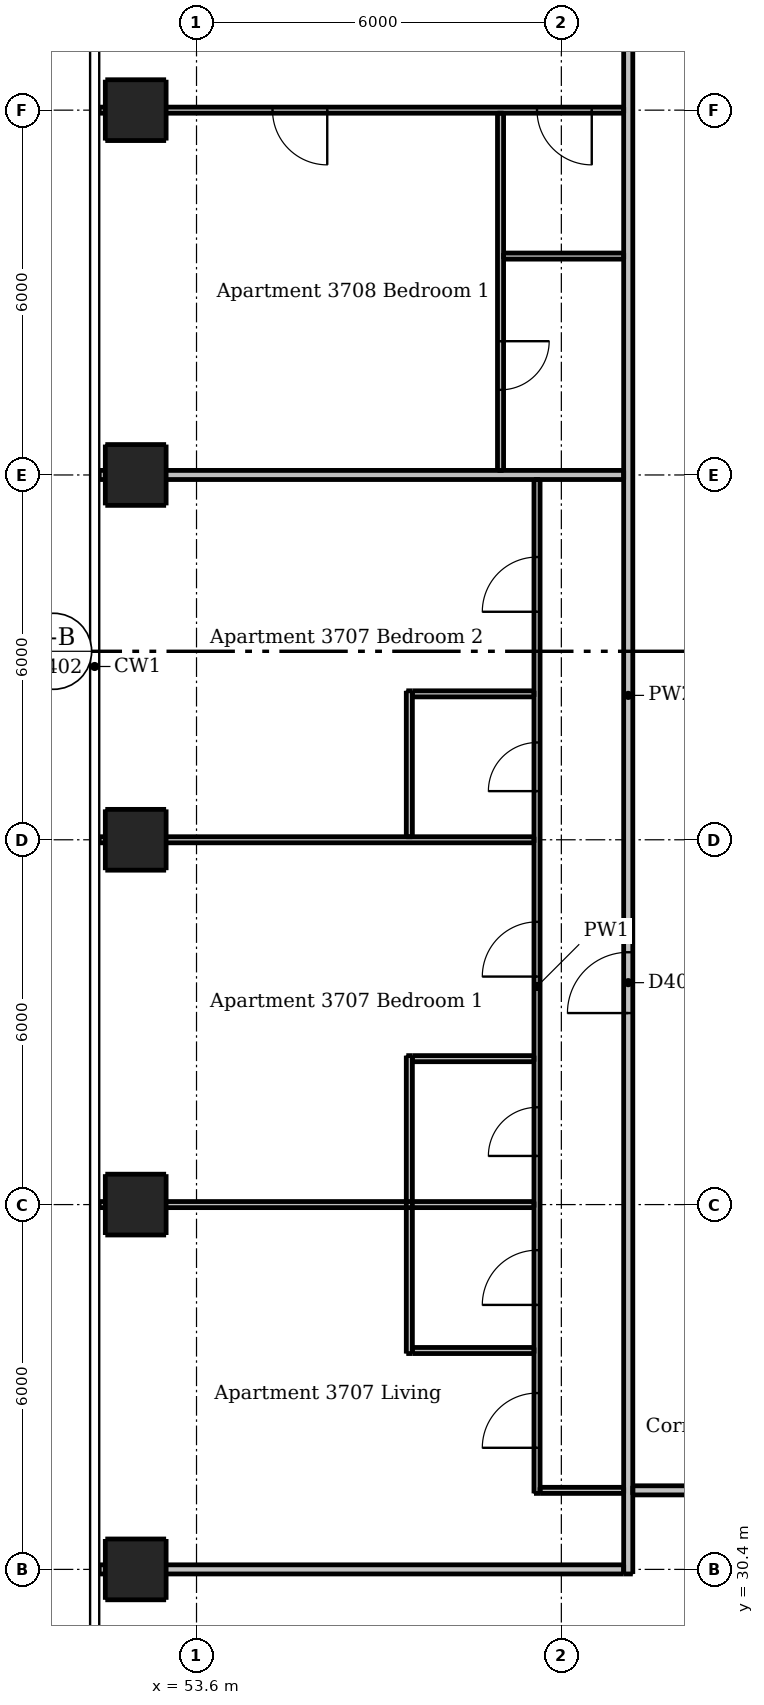
"""IFC4 building model, lengths in metres.
Left out: names, types, materials, properties, quantities, classifications, styles, units other than length and angle.
Written with IfcOpenShell. Run it as: python <this file> out.ifc"""

import sys

from ifc_helpers import new_model, si_unit, direction, frame, frame_2d, origin, origin_2d, place, context, subcontext, project, spatial, rectangle, extrude, element, fill, save


model = new_model("IFC4")
c1 = context("Model", 3, precision=1e-05, world=origin(), true_north=direction((0.0, 1.0)))
c2 = subcontext(c1, "Body", "Model", "MODEL_VIEW")
j1 = project(units=[si_unit("LENGTHUNIT", "METRE"), si_unit("PLANEANGLEUNIT", "RADIAN")], contexts=[c1])
p1 = place(None, origin())
s1 = spatial("IfcSite", under=j1, at=p1, CompositionType="ELEMENT")
p2 = place(p1, origin())
s2 = spatial("IfcBuilding", under=s1, at=p2, CompositionType="ELEMENT")
p3 = place(p2, frame((0.0, 0.0, 140.5)))
s3 = spatial("IfcBuildingStorey", under=s2, at=p3, CompositionType="ELEMENT", Elevation=140.5)
for number, where, z_axis, x_axis in (
    (1, (52.6, 30.4, 0.0), (0.0, 0.0, 1.0), (1.0, 0.0, 0.0)),
    (2, (52.6, 36.4, 0.0), (0.0, 0.0, 1.0), (1.0, 0.0, 0.0)),
    (3, (52.6, 42.4, 0.0), (0.0, 0.0, 1.0), (1.0, 0.0, 0.0)),
    (4, (52.6, 48.4, 0.0), (0.0, 0.0, 1.0), (1.0, 0.0, 0.0)),
    (5, (52.6, 54.4, 0.0), (0.0, 0.0, 1.0), (1.0, 0.0, 0.0)),
):
    element("IfcColumn", number, at=place(p3, frame(where, z_axis=z_axis, x_axis=x_axis)), inside=s3, PredefinedType="COLUMN", context=c2, shape_type="SweptSolid", body=[
        extrude(rectangle(XDim=1.0, YDim=1.0, at=origin_2d()), origin(), (0.0, 0.0, 1.0), 3.05),
    ])
p4 = place(p3, frame((57.1, 33.95, 0.0), z_axis=(0.0, 0.0, 1.0), x_axis=(0.0, 1.0, 0.0)))
e6 = element("IfcWall", 6, at=p4, inside=s3, PredefinedType="PARTITIONING", context=c2, shape_type="SweptSolid", body=[
    extrude(rectangle(XDim=4.9, YDim=0.1, at=frame_2d((2.45, 0.0))), origin(), (0.0, 0.0, 1.0), 3.05),
])
p5 = place(p3, frame((57.1, 42.45, 0.0), z_axis=(0.0, 0.0, 1.0), x_axis=(0.0, 1.0, 0.0)))
e7 = element("IfcWall", 7, at=p5, inside=s3, PredefinedType="PARTITIONING", context=c2, shape_type="SweptSolid", body=[
    extrude(rectangle(XDim=2.4, YDim=0.1, at=frame_2d((1.2, 0.0))), origin(), (0.0, 0.0, 1.0), 3.05),
])
p6 = place(p3, frame((58.6, 54.35, 0.0), z_axis=(0.0, 0.0, 1.0), x_axis=(0.0, -1.0, 0.0)))
e8 = element("IfcWall", 8, at=p6, inside=s3, PredefinedType="PARTITIONING", context=c2, shape_type="SweptSolid", body=[
    extrude(rectangle(XDim=5.875, YDim=0.1, at=frame_2d((2.938, 0.0))), origin(), (0.0, 0.0, 1.0), 3.05),
])
p7 = place(p6, frame((3.75, 0.0, 0.0)))
e9 = element("IfcOpeningElement", 9, at=p7, cuts=e8, PredefinedType="OPENING", context=c2, shape_type="SweptSolid", body=[
    extrude(rectangle(XDim=0.8, YDim=2.1, at=frame_2d((0.4, 1.05))), frame((0.0, 0.06, 0.0), z_axis=(0.0, -1.0, 0.0), x_axis=(1.0, 0.0, 0.0)), (0.0, 0.0, 1.0), 0.12),
])
p8 = place(p3, frame((59.2, 31.65, 0.0), z_axis=(0.0, 0.0, 1.0), x_axis=(0.0, 1.0, 0.0)))
e10 = element("IfcWall", 10, at=p8, inside=s3, PredefinedType="PARTITIONING", context=c2, shape_type="SweptSolid", body=[
    extrude(rectangle(XDim=16.675, YDim=0.1, at=frame_2d((8.337, 0.0))), origin(), (0.0, 0.0, 1.0), 3.05),
])
p9 = place(p8, frame((0.75, 0.0, 0.0)))
e11 = element("IfcOpeningElement", 11, at=p9, cuts=e10, PredefinedType="OPENING", context=c2, shape_type="SweptSolid", body=[
    extrude(rectangle(XDim=0.9, YDim=2.1, at=frame_2d((0.45, 1.05))), frame((0.0, 0.06, 0.0), z_axis=(0.0, -1.0, 0.0), x_axis=(1.0, 0.0, 0.0)), (0.0, 0.0, 1.0), 0.12),
])
p10 = place(p8, frame((3.1, 0.0, 0.0)))
e12 = element("IfcOpeningElement", 12, at=p10, cuts=e10, PredefinedType="OPENING", context=c2, shape_type="SweptSolid", body=[
    extrude(rectangle(XDim=0.9, YDim=2.1, at=frame_2d((0.45, 1.05))), frame((0.0, 0.06, 0.0), z_axis=(0.0, -1.0, 0.0), x_axis=(1.0, 0.0, 0.0)), (0.0, 0.0, 1.0), 0.12),
])
p11 = place(p8, frame((8.5, 0.0, 0.0)))
e13 = element("IfcOpeningElement", 13, at=p11, cuts=e10, PredefinedType="OPENING", context=c2, shape_type="SweptSolid", body=[
    extrude(rectangle(XDim=0.9, YDim=2.1, at=frame_2d((0.45, 1.05))), frame((0.0, 0.06, 0.0), z_axis=(0.0, -1.0, 0.0), x_axis=(1.0, 0.0, 0.0)), (0.0, 0.0, 1.0), 0.12),
])
p12 = place(p8, frame((14.5, 0.0, 0.0)))
e14 = element("IfcOpeningElement", 14, at=p12, cuts=e10, PredefinedType="OPENING", context=c2, shape_type="SweptSolid", body=[
    extrude(rectangle(XDim=0.9, YDim=2.1, at=frame_2d((0.45, 1.05))), frame((0.0, 0.06, 0.0), z_axis=(0.0, -1.0, 0.0), x_axis=(1.0, 0.0, 0.0)), (0.0, 0.0, 1.0), 0.12),
])
p13 = place(p8, frame((5.55, 0.0, 0.0)))
e15 = element("IfcOpeningElement", 15, at=p13, cuts=e10, PredefinedType="OPENING", context=c2, shape_type="SweptSolid", body=[
    extrude(rectangle(XDim=0.8, YDim=2.1, at=frame_2d((0.4, 1.05))), frame((0.0, 0.06, 0.0), z_axis=(0.0, -1.0, 0.0), x_axis=(1.0, 0.0, 0.0)), (0.0, 0.0, 1.0), 0.12),
])
p14 = place(p8, frame((11.55, 0.0, 0.0)))
e16 = element("IfcOpeningElement", 16, at=p14, cuts=e10, PredefinedType="OPENING", context=c2, shape_type="SweptSolid", body=[
    extrude(rectangle(XDim=0.8, YDim=2.1, at=frame_2d((0.4, 1.05))), frame((0.0, 0.06, 0.0), z_axis=(0.0, -1.0, 0.0), x_axis=(1.0, 0.0, 0.0)), (0.0, 0.0, 1.0), 0.12),
])
p15 = place(p3, frame((60.625, 54.4, 0.0), z_axis=(0.0, 0.0, 1.0), x_axis=(-1.0, 0.0, 0.0)))
e17 = element("IfcWall", 17, at=p15, inside=s3, PredefinedType="PARTITIONING", context=c2, shape_type="SweptSolid", body=[
    extrude(rectangle(XDim=8.625, YDim=0.1, at=frame_2d((4.312, 0.0))), origin(), (0.0, 0.0, 1.0), 2.516),
])
p16 = place(p15, frame((0.525, 0.0, 0.0)))
e18 = element("IfcOpeningElement", 18, at=p16, cuts=e17, PredefinedType="OPENING", context=c2, shape_type="SweptSolid", body=[
    extrude(rectangle(XDim=0.9, YDim=2.1, at=frame_2d((0.45, 1.05))), frame((0.0, 0.06, 0.0), z_axis=(0.0, -1.0, 0.0), x_axis=(1.0, 0.0, 0.0)), (0.0, 0.0, 1.0), 0.12),
])
p17 = place(p15, frame((4.875, 0.0, 0.0)))
e19 = element("IfcOpeningElement", 19, at=p17, cuts=e17, PredefinedType="OPENING", context=c2, shape_type="SweptSolid", body=[
    extrude(rectangle(XDim=0.9, YDim=2.1, at=frame_2d((0.45, 1.05))), frame((0.0, 0.06, 0.0), z_axis=(0.0, -1.0, 0.0), x_axis=(1.0, 0.0, 0.0)), (0.0, 0.0, 1.0), 0.12),
])
p18 = place(p3, frame((58.65, 52.0, 0.0), z_axis=(0.0, 0.0, 1.0), x_axis=(1.0, 0.0, 0.0)))
e20 = element("IfcWall", 20, at=p18, inside=s3, PredefinedType="PARTITIONING", context=c2, shape_type="SweptSolid", body=[
    extrude(rectangle(XDim=1.975, YDim=0.1, at=frame_2d((0.988, 0.0))), origin(), (0.0, 0.0, 1.0), 3.05),
])
p19 = place(p3, frame((57.15, 44.8, 0.0), z_axis=(0.0, 0.0, 1.0), x_axis=(1.0, 0.0, 0.0)))
e21 = element("IfcWall", 21, at=p19, inside=s3, PredefinedType="PARTITIONING", context=c2, shape_type="SweptSolid", body=[
    extrude(rectangle(XDim=2.0, YDim=0.1, at=frame_2d((1.0, 0.0))), origin(), (0.0, 0.0, 1.0), 3.05),
])
p20 = place(p3, frame((52.0, 42.4, 0.0), z_axis=(0.0, 0.0, 1.0), x_axis=(1.0, 0.0, 0.0)))
e22 = element("IfcWall", 22, at=p20, inside=s3, PredefinedType="PARTITIONING", context=c2, shape_type="SweptSolid", body=[
    extrude(rectangle(XDim=7.15, YDim=0.1, at=frame_2d((3.575, 0.0))), origin(), (0.0, 0.0, 1.0), 2.516),
])
p21 = place(p3, frame((57.15, 38.8, 0.0), z_axis=(0.0, 0.0, 1.0), x_axis=(1.0, 0.0, 0.0)))
e23 = element("IfcWall", 23, at=p21, inside=s3, PredefinedType="PARTITIONING", context=c2, shape_type="SweptSolid", body=[
    extrude(rectangle(XDim=2.0, YDim=0.1, at=frame_2d((1.0, 0.0))), origin(), (0.0, 0.0, 1.0), 3.05),
])
p22 = place(p3, frame((52.0, 36.4, 0.0), z_axis=(0.0, 0.0, 1.0), x_axis=(1.0, 0.0, 0.0)))
e24 = element("IfcWall", 24, at=p22, inside=s3, PredefinedType="PARTITIONING", context=c2, shape_type="SweptSolid", body=[
    extrude(rectangle(XDim=7.15, YDim=0.1, at=frame_2d((3.575, 0.0))), origin(), (0.0, 0.0, 1.0), 2.516),
])
p23 = place(p3, frame((57.15, 34.0, 0.0), z_axis=(0.0, 0.0, 1.0), x_axis=(1.0, 0.0, 0.0)))
e25 = element("IfcWall", 25, at=p23, inside=s3, PredefinedType="PARTITIONING", context=c2, shape_type="SweptSolid", body=[
    extrude(rectangle(XDim=2.0, YDim=0.1, at=frame_2d((1.0, 0.0))), origin(), (0.0, 0.0, 1.0), 3.05),
])
p24 = place(p3, frame((59.25, 31.7, 0.0), z_axis=(0.0, 0.0, 1.0), x_axis=(1.0, 0.0, 0.0)))
e26 = element("IfcWall", 26, at=p24, inside=s3, PredefinedType="PARTITIONING", context=c2, shape_type="SweptSolid", body=[
    extrude(rectangle(XDim=1.375, YDim=0.1, at=frame_2d((0.688, 0.0))), origin(), (0.0, 0.0, 1.0), 3.05),
])
p25 = place(p3, frame((60.7, 30.325, 0.0), z_axis=(0.0, 0.0, 1.0), x_axis=(0.0, 1.0, 0.0)))
e27 = element("IfcWall", 27, at=p25, inside=s3, PredefinedType="PARTITIONING", context=c2, shape_type="SweptSolid", body=[
    extrude(rectangle(XDim=28.9, YDim=0.15, at=frame_2d((14.45, 0.0))), origin(), (0.0, 0.0, 1.0), 3.05),
])
p26 = place(p25, frame((9.225, 0.0, 0.0)))
e28 = element("IfcOpeningElement", 28, at=p26, cuts=e27, PredefinedType="OPENING", context=c2, shape_type="SweptSolid", body=[
    extrude(rectangle(XDim=1.0, YDim=2.1, at=frame_2d((0.5, 1.05))), frame((0.0, 0.085, 0.0), z_axis=(0.0, -1.0, 0.0), x_axis=(1.0, 0.0, 0.0)), (0.0, 0.0, 1.0), 0.17),
])
p27 = place(p25, frame((26.025, 0.0, 0.0)))
e29 = element("IfcOpeningElement", 29, at=p27, cuts=e27, PredefinedType="OPENING", context=c2, shape_type="SweptSolid", body=[
    extrude(rectangle(XDim=1.0, YDim=2.1, at=frame_2d((0.5, 1.05))), frame((0.0, 0.085, 0.0), z_axis=(0.0, -1.0, 0.0), x_axis=(1.0, 0.0, 0.0)), (0.0, 0.0, 1.0), 0.17),
])
p28 = place(p3, frame((52.0, 48.4, 0.0), z_axis=(0.0, 0.0, 1.0), x_axis=(1.0, 0.0, 0.0)))
e30 = element("IfcWall", 30, at=p28, inside=s3, PredefinedType="PARTITIONING", context=c2, shape_type="SweptSolid", body=[
    extrude(rectangle(XDim=8.625, YDim=0.15, at=frame_2d((4.312, 0.0))), origin(), (0.0, 0.0, 1.0), 2.516),
])
p29 = place(p3, frame((89.525, 31.7, 0.0), z_axis=(0.0, 0.0, 1.0), x_axis=(-1.0, 0.0, 0.0)))
e31 = element("IfcWall", 31, at=p29, inside=s3, PredefinedType="PARTITIONING", context=c2, shape_type="SweptSolid", body=[
    extrude(rectangle(XDim=28.75, YDim=0.15, at=frame_2d((14.375, 0.0))), origin(), (0.0, 0.0, 1.0), 3.05),
])
p30 = place(p29, frame((25.875, 0.0, 0.0)))
e32 = element("IfcOpeningElement", 32, at=p30, cuts=e31, PredefinedType="OPENING", context=c2, shape_type="SweptSolid", body=[
    extrude(rectangle(XDim=1.0, YDim=2.1, at=frame_2d((0.5, 1.05))), frame((0.0, 0.085, 0.0), z_axis=(0.0, -1.0, 0.0), x_axis=(1.0, 0.0, 0.0)), (0.0, 0.0, 1.0), 0.17),
])
p31 = place(p29, frame((9.075, 0.0, 0.0)))
e33 = element("IfcOpeningElement", 33, at=p31, cuts=e31, PredefinedType="OPENING", context=c2, shape_type="SweptSolid", body=[
    extrude(rectangle(XDim=1.0, YDim=2.1, at=frame_2d((0.5, 1.05))), frame((0.0, 0.085, 0.0), z_axis=(0.0, -1.0, 0.0), x_axis=(1.0, 0.0, 0.0)), (0.0, 0.0, 1.0), 0.17),
])
p32 = place(p3, frame((52.0, 30.4, 0.0), z_axis=(0.0, 0.0, 1.0), x_axis=(1.0, 0.0, 0.0)))
e34 = element("IfcWall", 34, at=p32, inside=s3, PredefinedType="PARTITIONING", context=c2, shape_type="SweptSolid", body=[
    extrude(rectangle(XDim=8.625, YDim=0.15, at=frame_2d((4.312, 0.0))), origin(), (0.0, 0.0, 1.0), 2.647),
])
p33 = place(p26, origin())
e35 = element("IfcDoor", 35, at=p33, inside=s3, OperationType="SINGLE_SWING_LEFT", PredefinedType="DOOR", context=c2, shape_type="SweptSolid", body=[
    extrude(rectangle(XDim=1.0, YDim=2.1, at=frame_2d((0.5, 1.05))), frame((0.0, 0.025, 0.0), z_axis=(0.0, -1.0, 0.0), x_axis=(1.0, 0.0, 0.0)), (0.0, 0.0, 1.0), 0.05),
])
fill(e28, e35)
p34 = place(p9, origin())
e36 = element("IfcDoor", 36, at=p34, inside=s3, OperationType="SINGLE_SWING_LEFT", PredefinedType="DOOR", context=c2, shape_type="SweptSolid", body=[
    extrude(rectangle(XDim=0.9, YDim=2.1, at=frame_2d((0.45, 1.05))), frame((0.0, 0.025, 0.0), z_axis=(0.0, -1.0, 0.0), x_axis=(1.0, 0.0, 0.0)), (0.0, 0.0, 1.0), 0.05),
])
fill(e11, e36)
p35 = place(p10, origin())
e37 = element("IfcDoor", 37, at=p35, inside=s3, OperationType="SINGLE_SWING_LEFT", PredefinedType="DOOR", context=c2, shape_type="SweptSolid", body=[
    extrude(rectangle(XDim=0.9, YDim=2.1, at=frame_2d((0.45, 1.05))), frame((0.0, 0.025, 0.0), z_axis=(0.0, -1.0, 0.0), x_axis=(1.0, 0.0, 0.0)), (0.0, 0.0, 1.0), 0.05),
])
fill(e12, e37)
p36 = place(p11, origin())
e38 = element("IfcDoor", 38, at=p36, inside=s3, OperationType="SINGLE_SWING_LEFT", PredefinedType="DOOR", context=c2, shape_type="SweptSolid", body=[
    extrude(rectangle(XDim=0.9, YDim=2.1, at=frame_2d((0.45, 1.05))), frame((0.0, 0.025, 0.0), z_axis=(0.0, -1.0, 0.0), x_axis=(1.0, 0.0, 0.0)), (0.0, 0.0, 1.0), 0.05),
])
fill(e13, e38)
p37 = place(p12, origin())
e39 = element("IfcDoor", 39, at=p37, inside=s3, OperationType="SINGLE_SWING_LEFT", PredefinedType="DOOR", context=c2, shape_type="SweptSolid", body=[
    extrude(rectangle(XDim=0.9, YDim=2.1, at=frame_2d((0.45, 1.05))), frame((0.0, 0.025, 0.0), z_axis=(0.0, -1.0, 0.0), x_axis=(1.0, 0.0, 0.0)), (0.0, 0.0, 1.0), 0.05),
])
fill(e14, e39)
p38 = place(p13, origin())
e40 = element("IfcDoor", 40, at=p38, inside=s3, OperationType="SINGLE_SWING_LEFT", PredefinedType="DOOR", context=c2, shape_type="SweptSolid", body=[
    extrude(rectangle(XDim=0.8, YDim=2.1, at=frame_2d((0.4, 1.05))), frame((0.0, 0.025, 0.0), z_axis=(0.0, -1.0, 0.0), x_axis=(1.0, 0.0, 0.0)), (0.0, 0.0, 1.0), 0.05),
])
fill(e15, e40)
p39 = place(p14, origin())
e41 = element("IfcDoor", 41, at=p39, inside=s3, OperationType="SINGLE_SWING_LEFT", PredefinedType="DOOR", context=c2, shape_type="SweptSolid", body=[
    extrude(rectangle(XDim=0.8, YDim=2.1, at=frame_2d((0.4, 1.05))), frame((0.0, 0.025, 0.0), z_axis=(0.0, -1.0, 0.0), x_axis=(1.0, 0.0, 0.0)), (0.0, 0.0, 1.0), 0.05),
])
fill(e16, e41)
p40 = place(p16, origin())
e42 = element("IfcDoor", 42, at=p40, inside=s3, OperationType="SINGLE_SWING_LEFT", PredefinedType="DOOR", context=c2, shape_type="SweptSolid", body=[
    extrude(rectangle(XDim=0.9, YDim=2.1, at=frame_2d((0.45, 1.05))), frame((0.0, 0.025, 0.0), z_axis=(0.0, -1.0, 0.0), x_axis=(1.0, 0.0, 0.0)), (0.0, 0.0, 1.0), 0.05),
])
fill(e18, e42)
p41 = place(p17, origin())
e43 = element("IfcDoor", 43, at=p41, inside=s3, OperationType="SINGLE_SWING_LEFT", PredefinedType="DOOR", context=c2, shape_type="SweptSolid", body=[
    extrude(rectangle(XDim=0.9, YDim=2.1, at=frame_2d((0.45, 1.05))), frame((0.0, 0.025, 0.0), z_axis=(0.0, -1.0, 0.0), x_axis=(1.0, 0.0, 0.0)), (0.0, 0.0, 1.0), 0.05),
])
fill(e19, e43)
p42 = place(p7, origin())
e44 = element("IfcDoor", 44, at=p42, inside=s3, OperationType="SINGLE_SWING_LEFT", PredefinedType="DOOR", context=c2, shape_type="SweptSolid", body=[
    extrude(rectangle(XDim=0.8, YDim=2.1, at=frame_2d((0.4, 1.05))), frame((0.0, 0.025, 0.0), z_axis=(0.0, -1.0, 0.0), x_axis=(1.0, 0.0, 0.0)), (0.0, 0.0, 1.0), 0.05),
])
fill(e9, e44)
save(model, sys.argv[1])
